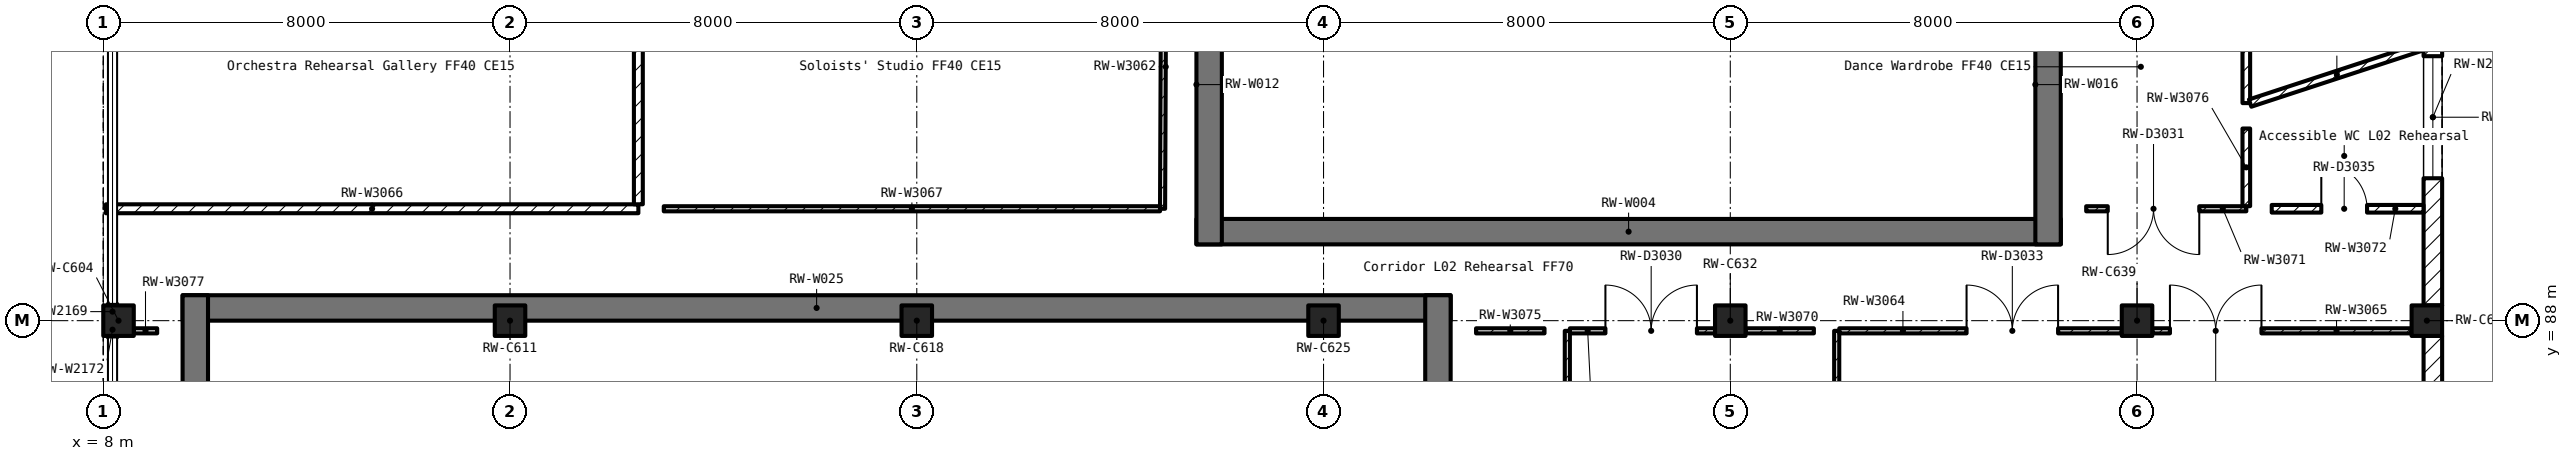
"""IFC4 building model, lengths in metres.
Left out: names, types, materials, properties, quantities, classifications, styles, units other than length and angle.
Written with IfcOpenShell. Run it as: python <this file> out.ifc"""

import sys

from ifc_helpers import new_model, si_unit, direction, frame, frame_2d, origin, origin_2d, place, context, subcontext, project, spatial, rectangle, extrude, element, fill, save


model = new_model("IFC4")
c1 = context("Model", 3, precision=1e-05, world=origin(), true_north=direction((0.0, 1.0)))
c2 = subcontext(c1, "Body", "Model", "MODEL_VIEW")
j1 = project(units=[si_unit("LENGTHUNIT", "METRE"), si_unit("PLANEANGLEUNIT", "RADIAN")], contexts=[c1])
p1 = place(None, origin())
s1 = spatial("IfcSite", under=j1, at=p1, CompositionType="ELEMENT")
p2 = place(p1, origin())
s2 = spatial("IfcBuilding", under=s1, at=p2, CompositionType="ELEMENT")
p3 = place(p2, frame((0.0, 0.0, 11.5)))
s3 = spatial("IfcBuildingStorey", under=s2, at=p3, CompositionType="ELEMENT", Elevation=11.5)
for number, where, z_axis, x_axis in (
    (1, (8.3, 88.0, 0.0), (0.0, 0.0, 1.0), (1.0, 0.0, 0.0)),
    (2, (16.0, 88.0, 0.0), (0.0, 0.0, 1.0), (1.0, 0.0, 0.0)),
    (3, (24.0, 88.0, 0.0), (0.0, 0.0, 1.0), (1.0, 0.0, 0.0)),
    (4, (32.0, 88.0, 0.0), (0.0, 0.0, 1.0), (1.0, 0.0, 0.0)),
    (5, (40.0, 88.0, 0.0), (0.0, 0.0, 1.0), (1.0, 0.0, 0.0)),
    (6, (48.0, 88.0, 0.0), (0.0, 0.0, 1.0), (1.0, 0.0, 0.0)),
    (7, (53.7, 88.0, 0.0), (0.0, 0.0, 1.0), (1.0, 0.0, 0.0)),
):
    element("IfcColumn", number, at=place(p3, frame(where, z_axis=z_axis, x_axis=x_axis)), inside=s3, PredefinedType="COLUMN", context=c2, shape_type="SweptSolid", body=[
        extrude(rectangle(XDim=0.6, YDim=0.6, at=origin_2d()), origin(), (0.0, 0.0, 1.0), 5.5),
    ])
p4 = place(p3, frame((29.5, 89.75, 0.0), z_axis=(0.0, 0.0, 1.0), x_axis=(1.0, 0.0, 0.0)))
e8 = element("IfcWall", 8, at=p4, inside=s3, PredefinedType="SHEAR", context=c2, shape_type="SweptSolid", body=[
    extrude(rectangle(XDim=17.0, YDim=0.5, at=frame_2d((8.5, 0.0))), origin(), (0.0, 0.0, 1.0), 5.35),
])
for number, where, z_axis, x_axis in (
    (9, (29.75, 89.5, 0.0), (0.0, 0.0, 1.0), (0.0, 1.0, 0.0)),
    (10, (46.25, 89.5, 0.0), (0.0, 0.0, 1.0), (0.0, 1.0, 0.0)),
):
    element("IfcWall", number, at=place(p3, frame(where, z_axis=z_axis, x_axis=x_axis)), inside=s3, PredefinedType="SHEAR", context=c2, shape_type="SweptSolid", body=[
        extrude(rectangle(XDim=21.0, YDim=0.5, at=frame_2d((10.5, 0.0))), origin(), (0.0, 0.0, 1.0), 5.35),
    ])
p5 = place(p3, frame((9.56, 88.25, 0.0), z_axis=(0.0, 0.0, 1.0), x_axis=(1.0, 0.0, 0.0)))
e11 = element("IfcWall", 11, at=p5, inside=s3, PredefinedType="SHEAR", context=c2, shape_type="SweptSolid", body=[
    extrude(rectangle(XDim=24.94, YDim=0.5, at=frame_2d((12.47, 0.0))), origin(), (0.0, 0.0, 1.0), 5.5),
])
for number, where, z_axis, x_axis in (
    (12, (9.81, 65.5, 0.0), (0.0, 0.0, 1.0), (0.0, 1.0, 0.0)),
    (13, (34.25, 65.5, 0.0), (0.0, 0.0, 1.0), (0.0, 1.0, 0.0)),
):
    element("IfcWall", number, at=place(p3, frame(where, z_axis=z_axis, x_axis=x_axis)), inside=s3, PredefinedType="SHEAR", context=c2, shape_type="SweptSolid", body=[
        extrude(rectangle(XDim=23.0, YDim=0.5, at=frame_2d((11.5, 0.0))), origin(), (0.0, 0.0, 1.0), 5.5),
    ])
p6 = place(p3, frame((53.818, 80.243, 0.0), z_axis=(0.0, 0.0, 1.0), x_axis=(0.0, 1.0, 0.0)))
e14 = element("IfcWall", 14, at=p6, inside=s3, PredefinedType="SOLIDWALL", context=c2, shape_type="SweptSolid", body=[
    extrude(rectangle(XDim=7.457, YDim=0.365, at=frame_2d((3.729, 0.0))), origin(), (0.0, 0.0, 1.0), 4.55),
])
p7 = place(p6, frame((2.529, 0.0, 1.0)))
e15 = element("IfcOpeningElement", 15, at=p7, cuts=e14, PredefinedType="OPENING", context=c2, shape_type="SweptSolid", body=[
    extrude(rectangle(XDim=2.4, YDim=2.0, at=frame_2d((1.2, 1.0))), frame((0.0, 0.195, 0.0), z_axis=(0.0, -1.0, 0.0), x_axis=(1.0, 0.0, 0.0)), (0.0, 0.0, 1.0), 0.389),
])
p8 = place(p3, frame((53.818, 88.3, 0.0), z_axis=(0.0, 0.0, 1.0), x_axis=(0.0, 1.0, 0.0)))
e16 = element("IfcWall", 16, at=p8, inside=s3, PredefinedType="SOLIDWALL", context=c2, shape_type="SweptSolid", body=[
    extrude(rectangle(XDim=7.4, YDim=0.365, at=frame_2d((3.7, 0.0))), origin(), (0.0, 0.0, 1.0), 4.55),
])
p9 = place(p8, frame((2.5, 0.0, 1.0)))
e17 = element("IfcOpeningElement", 17, at=p9, cuts=e16, PredefinedType="OPENING", context=c2, shape_type="SweptSolid", body=[
    extrude(rectangle(XDim=2.4, YDim=2.0, at=frame_2d((1.2, 1.0))), frame((0.0, 0.195, 0.0), z_axis=(0.0, -1.0, 0.0), x_axis=(1.0, 0.0, 0.0)), (0.0, 0.0, 1.0), 0.389),
])
p10 = place(p3, frame((36.795, 87.8, 0.0), z_axis=(0.0, 0.0, 1.0), x_axis=(0.0, -1.0, 0.0)))
e18 = element("IfcWall", 18, at=p10, inside=s3, PredefinedType="PARTITIONING", context=c2, shape_type="SweptSolid", body=[
    extrude(rectangle(XDim=23.75, YDim=0.1, at=frame_2d((11.875, 0.0))), origin(), (0.0, 0.0, 1.0), 4.45),
])
p11 = place(p10, frame((11.0, 0.0, 0.0)))
e19 = element("IfcOpeningElement", 19, at=p11, cuts=e18, PredefinedType="OPENING", context=c2, shape_type="SweptSolid", body=[
    extrude(rectangle(XDim=1.8, YDim=2.1, at=frame_2d((0.9, 1.05))), frame((0.0, 0.062, 0.0), z_axis=(0.0, -1.0, 0.0), x_axis=(1.0, 0.0, 0.0)), (0.0, 0.0, 1.0), 0.124),
])
p12 = place(p10, frame((15.0, 0.0, 0.0)))
e20 = element("IfcOpeningElement", 20, at=p12, cuts=e18, PredefinedType="OPENING", context=c2, shape_type="SweptSolid", body=[
    extrude(rectangle(XDim=1.8, YDim=2.1, at=frame_2d((0.9, 1.05))), frame((0.0, 0.062, 0.0), z_axis=(0.0, -1.0, 0.0), x_axis=(1.0, 0.0, 0.0)), (0.0, 0.0, 1.0), 0.124),
])
p13 = place(p3, frame((42.093, 87.8, 0.0), z_axis=(0.0, 0.0, 1.0), x_axis=(0.0, -1.0, 0.0)))
e21 = element("IfcWall", 21, at=p13, inside=s3, PredefinedType="PARTITIONING", context=c2, shape_type="SweptSolid", body=[
    extrude(rectangle(XDim=23.75, YDim=0.1, at=frame_2d((11.875, 0.0))), origin(), (0.0, 0.0, 1.0), 4.45),
])
p14 = place(p3, frame((28.928, 111.634, 0.0), z_axis=(0.0, 0.0, 1.0), x_axis=(-0.004385223343, -0.999990384862, 0.0)))
e22 = element("IfcWall", 22, at=p14, inside=s3, PredefinedType="PARTITIONING", context=c2, shape_type="SweptSolid", body=[
    extrude(rectangle(XDim=21.434, YDim=0.1, at=frame_2d((10.717, 0.0))), origin(), (0.0, 0.0, 1.0), 4.45),
])
p15 = place(p3, frame((50.149, 104.35, 0.0), z_axis=(0.0, 0.0, 1.0), x_axis=(0.0, -1.0, 0.0)))
e23 = element("IfcWall", 23, at=p15, inside=s3, PredefinedType="PARTITIONING", context=c2, shape_type="SweptSolid", body=[
    extrude(rectangle(XDim=12.072, YDim=0.15, at=frame_2d((6.036, 0.0))), origin(), (0.0, 0.0, 1.0), 4.45),
])
p16 = place(p15, frame((5.561, 0.0, 0.0)))
e24 = element("IfcOpeningElement", 24, at=p16, cuts=e23, PredefinedType="OPENING", context=c2, shape_type="SweptSolid", body=[
    extrude(rectangle(XDim=0.9, YDim=2.1, at=frame_2d((0.45, 1.05))), frame((0.0, 0.087, 0.0), z_axis=(0.0, -1.0, 0.0), x_axis=(1.0, 0.0, 0.0)), (0.0, 0.0, 1.0), 0.174),
])
p17 = place(p3, frame((42.144, 87.8, 0.0), z_axis=(0.0, 0.0, 1.0), x_axis=(1.0, 0.0, 0.0)))
e25 = element("IfcWall", 25, at=p17, inside=s3, PredefinedType="PARTITIONING", context=c2, shape_type="SweptSolid", body=[
    extrude(rectangle(XDim=5.556, YDim=0.1, at=frame_2d((2.778, 0.0))), origin(), (0.0, 0.0, 1.0), 4.45),
])
p18 = place(p17, frame((2.503, 0.0, 0.0)))
e26 = element("IfcOpeningElement", 26, at=p18, cuts=e25, PredefinedType="OPENING", context=c2, shape_type="SweptSolid", body=[
    extrude(rectangle(XDim=1.8, YDim=2.1, at=frame_2d((0.9, 1.05))), frame((0.0, 0.062, 0.0), z_axis=(0.0, -1.0, 0.0), x_axis=(1.0, 0.0, 0.0)), (0.0, 0.0, 1.0), 0.124),
])
p19 = place(p3, frame((48.3, 87.8, 0.0), z_axis=(0.0, 0.0, 1.0), x_axis=(1.0, 0.0, 0.0)))
e27 = element("IfcWall", 27, at=p19, inside=s3, PredefinedType="PARTITIONING", context=c2, shape_type="SweptSolid", body=[
    extrude(rectangle(XDim=5.1, YDim=0.1, at=frame_2d((2.55, 0.0))), origin(), (0.0, 0.0, 1.0), 4.45),
])
p20 = place(p19, frame((0.347, 0.0, 0.0)))
e28 = element("IfcOpeningElement", 28, at=p20, cuts=e27, PredefinedType="OPENING", context=c2, shape_type="SweptSolid", body=[
    extrude(rectangle(XDim=1.8, YDim=2.1, at=frame_2d((0.9, 1.05))), frame((0.0, 0.062, 0.0), z_axis=(0.0, -1.0, 0.0), x_axis=(1.0, 0.0, 0.0)), (0.0, 0.0, 1.0), 0.124),
])
p21 = place(p3, frame((18.524, 90.2, 0.0), z_axis=(0.0, 0.0, 1.0), x_axis=(-1.0, 0.0, 0.0)))
e29 = element("IfcWall", 29, at=p21, inside=s3, PredefinedType="PARTITIONING", context=c2, shape_type="SweptSolid", body=[
    extrude(rectangle(XDim=10.474, YDim=0.175, at=frame_2d((5.237, 0.0))), origin(), (0.0, 0.0, 1.0), 4.45),
])
p22 = place(p3, frame((28.784, 90.2, 0.0), z_axis=(0.0, 0.0, 1.0), x_axis=(-1.0, 0.0, 0.0)))
e30 = element("IfcWall", 30, at=p22, inside=s3, PredefinedType="PARTITIONING", context=c2, shape_type="SweptSolid", body=[
    extrude(rectangle(XDim=9.76, YDim=0.1, at=frame_2d((4.88, 0.0))), origin(), (0.0, 0.0, 1.0), 4.45),
])
p23 = place(p3, frame((18.524, 99.2, 0.0), z_axis=(0.0, 0.0, 1.0), x_axis=(0.0, -1.0, 0.0)))
e31 = element("IfcWall", 31, at=p23, inside=s3, PredefinedType="PARTITIONING", context=c2, shape_type="SweptSolid", body=[
    extrude(rectangle(XDim=8.912, YDim=0.175, at=frame_2d((4.456, 0.0))), origin(), (0.0, 0.0, 1.0), 4.45),
])
p24 = place(p3, frame((36.846, 87.8, 0.0), z_axis=(0.0, 0.0, 1.0), x_axis=(1.0, 0.0, 0.0)))
e32 = element("IfcWall", 32, at=p24, inside=s3, PredefinedType="PARTITIONING", context=c2, shape_type="SweptSolid", body=[
    extrude(rectangle(XDim=2.854, YDim=0.1, at=frame_2d((1.427, 0.0))), origin(), (0.0, 0.0, 1.0), 4.45),
])
p25 = place(p24, frame((0.698, 0.0, 0.0)))
e33 = element("IfcOpeningElement", 33, at=p25, cuts=e32, PredefinedType="OPENING", context=c2, shape_type="SweptSolid", body=[
    extrude(rectangle(XDim=1.8, YDim=2.1, at=frame_2d((0.9, 1.05))), frame((0.0, 0.062, 0.0), z_axis=(0.0, -1.0, 0.0), x_axis=(1.0, 0.0, 0.0)), (0.0, 0.0, 1.0), 0.124),
])
p26 = place(p3, frame((40.3, 87.8, 0.0), z_axis=(0.0, 0.0, 1.0), x_axis=(1.0, 0.0, 0.0)))
e34 = element("IfcWall", 34, at=p26, inside=s3, PredefinedType="PARTITIONING", context=c2, shape_type="SweptSolid", body=[
    extrude(rectangle(XDim=1.344, YDim=0.1, at=frame_2d((0.672, 0.0))), origin(), (0.0, 0.0, 1.0), 4.45),
])
p27 = place(p3, frame((50.149, 90.2, 0.0), z_axis=(0.0, 0.0, 1.0), x_axis=(-1.0, 0.0, 0.0)))
e35 = element("IfcWall", 35, at=p27, inside=s3, PredefinedType="PARTITIONING", context=c2, shape_type="SweptSolid", body=[
    extrude(rectangle(XDim=3.149, YDim=0.1, at=frame_2d((1.574, 0.0))), origin(), (0.0, 0.0, 1.0), 4.45),
])
p28 = place(p27, frame((0.925, 0.0, 0.0)))
e36 = element("IfcOpeningElement", 36, at=p28, cuts=e35, PredefinedType="OPENING", context=c2, shape_type="SweptSolid", body=[
    extrude(rectangle(XDim=1.8, YDim=2.1, at=frame_2d((0.9, 1.05))), frame((0.0, 0.062, 0.0), z_axis=(0.0, -1.0, 0.0), x_axis=(1.0, 0.0, 0.0)), (0.0, 0.0, 1.0), 0.124),
])
p29 = place(p3, frame((50.649, 90.2, 0.0), z_axis=(0.0, 0.0, 1.0), x_axis=(1.0, 0.0, 0.0)))
e37 = element("IfcWall", 37, at=p29, inside=s3, PredefinedType="PARTITIONING", context=c2, shape_type="SweptSolid", body=[
    extrude(rectangle(XDim=2.986, YDim=0.15, at=frame_2d((1.493, 0.0))), origin(), (0.0, 0.0, 1.0), 4.45),
])
p30 = place(p29, frame((0.975, 0.0, 0.0)))
e38 = element("IfcOpeningElement", 38, at=p30, cuts=e37, PredefinedType="OPENING", context=c2, shape_type="SweptSolid", body=[
    extrude(rectangle(XDim=0.9, YDim=2.1, at=frame_2d((0.45, 1.05))), frame((0.0, 0.087, 0.0), z_axis=(0.0, -1.0, 0.0), x_axis=(1.0, 0.0, 0.0)), (0.0, 0.0, 1.0), 0.174),
])
p31 = place(p3, frame((50.225, 92.278, 0.0), z_axis=(0.0, 0.0, 1.0), x_axis=(0.950317009652, 0.311283763096, 0.0)))
e39 = element("IfcWall", 39, at=p31, inside=s3, PredefinedType="PARTITIONING", context=c2, shape_type="SweptSolid", body=[
    extrude(rectangle(XDim=3.588, YDim=0.15, at=frame_2d((1.794, 0.0))), origin(), (0.0, 0.0, 1.0), 4.45),
])
p32 = place(p3, frame((35.0, 87.8, 0.0), z_axis=(0.0, 0.0, 1.0), x_axis=(1.0, 0.0, 0.0)))
e40 = element("IfcWall", 40, at=p32, inside=s3, PredefinedType="PARTITIONING", context=c2, shape_type="SweptSolid", body=[
    extrude(rectangle(XDim=1.346, YDim=0.1, at=frame_2d((0.673, 0.0))), origin(), (0.0, 0.0, 1.0), 4.45),
])
p33 = place(p3, frame((50.149, 91.778, 0.0), z_axis=(0.0, 0.0, 1.0), x_axis=(0.0, -1.0, 0.0)))
e41 = element("IfcWall", 41, at=p33, inside=s3, PredefinedType="PARTITIONING", context=c2, shape_type="SweptSolid", body=[
    extrude(rectangle(XDim=1.527, YDim=0.15, at=frame_2d((0.764, 0.0))), origin(), (0.0, 0.0, 1.0), 4.45),
])
p34 = place(p3, frame((8.601, 87.8, 0.0), z_axis=(0.0, 0.0, 1.0), x_axis=(1.0, 0.0, 0.0)))
e42 = element("IfcWall", 42, at=p34, inside=s3, PredefinedType="PARTITIONING", context=c2, shape_type="SweptSolid", body=[
    extrude(rectangle(XDim=0.459, YDim=0.1, at=frame_2d((0.229, 0.0))), origin(), (0.0, 0.0, 1.0), 4.45),
])
for number, where, z_axis, x_axis in (
    (43, (8.182, 88.33, 0.0), (0.0, 0.0, 1.0), (0.0, -1.0, 0.0)),
    (44, (8.182, 87.67, 0.0), (0.0, 0.0, 1.0), (0.0, 1.0, 0.0)),
):
    element("IfcWall", number, at=place(p3, frame(where, z_axis=z_axis, x_axis=x_axis)), inside=s3, PredefinedType="SOLIDWALL", context=c2, shape_type="SweptSolid", body=[
        extrude(rectangle(XDim=0.305, YDim=0.18, at=frame_2d((0.153, 0.0))), origin(), (0.0, 0.0, 1.0), 3.7),
    ])
p35 = place(p9, origin())
e45 = element("IfcWindow", 45, at=p35, inside=s3, PartitioningType="DOUBLE_PANEL_VERTICAL", PredefinedType="WINDOW", context=c2, shape_type="SweptSolid", body=[
    extrude(rectangle(XDim=2.4, YDim=2.0, at=frame_2d((1.2, 1.0))), frame((0.0, 0.03, 0.0), z_axis=(0.0, -1.0, 0.0), x_axis=(1.0, 0.0, 0.0)), (0.0, 0.0, 1.0), 0.06),
])
fill(e17, e45)
p36 = place(p25, origin())
e46 = element("IfcDoor", 46, at=p36, inside=s3, OperationType="DOUBLE_DOOR_SINGLE_SWING", PredefinedType="DOOR", context=c2, shape_type="SweptSolid", body=[
    extrude(rectangle(XDim=1.8, YDim=2.1, at=frame_2d((0.9, 1.05))), frame((0.0, 0.025, 0.0), z_axis=(0.0, -1.0, 0.0), x_axis=(1.0, 0.0, 0.0)), (0.0, 0.0, 1.0), 0.05),
])
fill(e33, e46)
p37 = place(p28, origin())
e47 = element("IfcDoor", 47, at=p37, inside=s3, OperationType="DOUBLE_DOOR_SINGLE_SWING", PredefinedType="DOOR", context=c2, shape_type="SweptSolid", body=[
    extrude(rectangle(XDim=1.8, YDim=2.1, at=frame_2d((0.9, 1.05))), frame((0.0, 0.025, 0.0), z_axis=(0.0, -1.0, 0.0), x_axis=(1.0, 0.0, 0.0)), (0.0, 0.0, 1.0), 0.05),
])
fill(e36, e47)
p38 = place(p20, origin())
e48 = element("IfcDoor", 48, at=p38, inside=s3, OperationType="DOUBLE_DOOR_SINGLE_SWING", PredefinedType="DOOR", context=c2, shape_type="SweptSolid", body=[
    extrude(rectangle(XDim=1.8, YDim=2.1, at=frame_2d((0.9, 1.05))), frame((0.0, 0.025, 0.0), z_axis=(0.0, -1.0, 0.0), x_axis=(1.0, 0.0, 0.0)), (0.0, 0.0, 1.0), 0.05),
])
fill(e28, e48)
p39 = place(p18, origin())
e49 = element("IfcDoor", 49, at=p39, inside=s3, OperationType="DOUBLE_DOOR_SINGLE_SWING", PredefinedType="DOOR", context=c2, shape_type="SweptSolid", body=[
    extrude(rectangle(XDim=1.8, YDim=2.1, at=frame_2d((0.9, 1.05))), frame((0.0, 0.025, 0.0), z_axis=(0.0, -1.0, 0.0), x_axis=(1.0, 0.0, 0.0)), (0.0, 0.0, 1.0), 0.05),
])
fill(e26, e49)
p40 = place(p30, origin())
e50 = element("IfcDoor", 50, at=p40, inside=s3, OperationType="SINGLE_SWING_LEFT", PredefinedType="DOOR", context=c2, shape_type="SweptSolid", body=[
    extrude(rectangle(XDim=0.9, YDim=2.1, at=frame_2d((0.45, 1.05))), frame((0.0, 0.025, 0.0), z_axis=(0.0, -1.0, 0.0), x_axis=(1.0, 0.0, 0.0)), (0.0, 0.0, 1.0), 0.05),
])
fill(e38, e50)
save(model, sys.argv[1])
